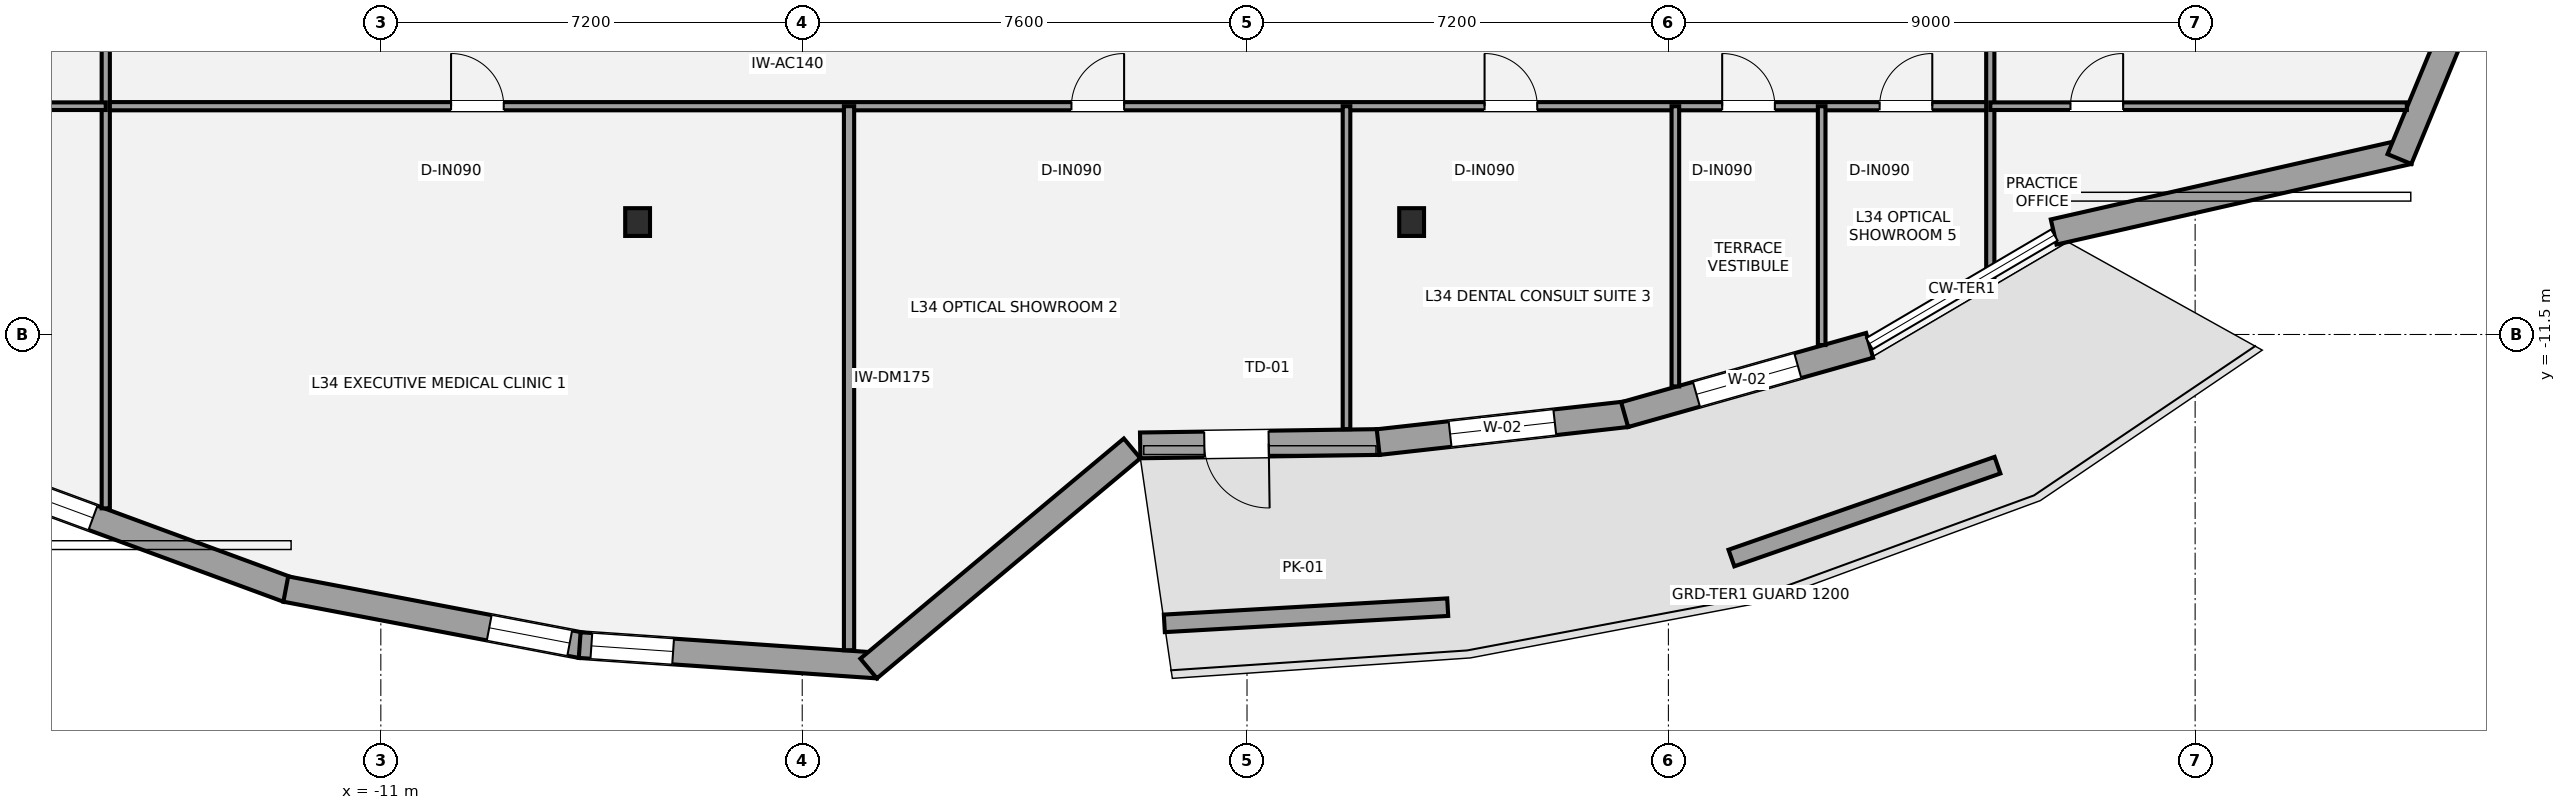
"""IFC4 building model, lengths in metres.
Left out: names, types, materials, properties, quantities, classifications, styles, units other than length and angle.
Written with IfcOpenShell. Run it as: python <this file> out.ifc"""

import sys

from ifc_helpers import new_model, si_unit, direction, frame, frame_2d, origin, origin_2d, place, context, subcontext, project, spatial, rectangle, i_section, extrude, element, fill, save


model = new_model("IFC4")
c1 = context("Model", 3, precision=1e-05, world=origin(), true_north=direction((0.0, 1.0)))
c2 = subcontext(c1, "Body", "Model", "MODEL_VIEW")
j1 = project(units=[si_unit("LENGTHUNIT", "METRE"), si_unit("PLANEANGLEUNIT", "RADIAN")], contexts=[c1])
p1 = place(None, origin())
s1 = spatial("IfcSite", under=j1, at=p1, CompositionType="ELEMENT")
p2 = place(p1, origin())
s2 = spatial("IfcBuilding", under=s1, at=p2, CompositionType="ELEMENT")
p3 = place(p2, frame((0.0, 0.0, 128.1)))
s3 = spatial("IfcBuildingStorey", under=s2, at=p3, CompositionType="ELEMENT", Elevation=128.1)
for number, where, z_axis, x_axis in (
    (1, (-6.613, -9.579, 0.0), (0.0, 0.0, 1.0), (1.0, 0.0, 0.0)),
    (2, (6.613, -9.579, 0.0), (0.0, 0.0, 1.0), (1.0, 0.0, 0.0)),
):
    element("IfcColumn", number, at=place(p3, frame(where, z_axis=z_axis, x_axis=x_axis)), inside=s3, PredefinedType="COLUMN", context=c2, shape_type="SweptSolid", body=[
        extrude(i_section(OverallWidth=0.424, OverallDepth=0.474, WebThickness=0.048, FlangeThickness=0.077, at=origin_2d()), origin(), (0.0, 0.0, 1.0), 3.5),
    ])
p4 = place(p3, frame((-12.589, -15.859, 0.0), z_axis=(0.0, 0.0, 1.0), x_axis=(-0.938408147313, 0.345528796278, 0.0)))
e3 = element("IfcWall", 3, at=p4, inside=s3, PredefinedType="STANDARD", context=c2, shape_type="SweptSolid", body=[
    extrude(rectangle(XDim=4.998, YDim=0.44, at=frame_2d((2.499, 0.0))), origin(), (0.0, 0.0, 1.0), 2.528),
])
p5 = place(p4, frame((3.548, 0.0, 0.58)))
e4 = element("IfcOpeningElement", 4, at=p5, cuts=e3, PredefinedType="OPENING", context=c2, shape_type="SweptSolid", body=[
    extrude(rectangle(XDim=0.9, YDim=1.35, at=frame_2d((0.45, 0.675))), frame((0.0, 0.23, 0.0), z_axis=(0.0, -1.0, 0.0), x_axis=(1.0, 0.0, 0.0)), (0.0, 0.0, 1.0), 0.46),
])
p6 = place(p3, frame((-7.576, -16.809, 0.0), z_axis=(0.0, 0.0, 1.0), x_axis=(-0.982383038938, 0.186878476041, 0.0)))
e5 = element("IfcWall", 5, at=p6, inside=s3, PredefinedType="STANDARD", context=c2, shape_type="SweptSolid", body=[
    extrude(rectangle(XDim=5.138, YDim=0.44, at=frame_2d((2.569, 0.0))), origin(), (0.0, 0.0, 1.0), 2.528),
])
p7 = place(p6, frame((0.2, 0.0, 0.45)))
e6 = element("IfcOpeningElement", 6, at=p7, cuts=e5, PredefinedType="OPENING", context=c2, shape_type="SweptSolid", body=[
    extrude(rectangle(XDim=1.4, YDim=1.55, at=frame_2d((0.7, 0.775))), frame((0.0, 0.23, 0.0), z_axis=(0.0, -1.0, 0.0), x_axis=(1.0, 0.0, 0.0)), (0.0, 0.0, 1.0), 0.46),
])
p8 = place(p3, frame((-2.509, -17.156, 0.0), z_axis=(0.0, 0.0, 1.0), x_axis=(-0.997652685464, 0.068477143536, 0.0)))
e7 = element("IfcWall", 7, at=p8, inside=s3, PredefinedType="STANDARD", context=c2, shape_type="SweptSolid", body=[
    extrude(rectangle(XDim=5.105, YDim=0.44, at=frame_2d((2.553, 0.0))), origin(), (0.0, 0.0, 1.0), 2.528),
])
p9 = place(p8, frame((3.505, 0.0, 0.58)))
e8 = element("IfcOpeningElement", 8, at=p9, cuts=e7, PredefinedType="OPENING", context=c2, shape_type="SweptSolid", body=[
    extrude(rectangle(XDim=1.4, YDim=1.55, at=frame_2d((0.7, 0.775))), frame((0.0, 0.23, 0.0), z_axis=(0.0, -1.0, 0.0), x_axis=(1.0, 0.0, 0.0)), (0.0, 0.0, 1.0), 0.46),
])
p10 = place(p3, frame((1.837, -13.446, 0.0), z_axis=(0.0, 0.0, 1.0), x_axis=(-0.767459949595, -0.641096892652, 0.0)))
e9 = element("IfcWall", 9, at=p10, inside=s3, PredefinedType="STANDARD", context=c2, shape_type="SweptSolid", body=[
    extrude(rectangle(XDim=5.866, YDim=0.44, at=frame_2d((2.933, 0.0))), origin(), (0.0, 0.0, 1.0), 2.528),
])
p11 = place(p3, frame((6.062, -13.337, 0.0), z_axis=(0.0, 0.0, 1.0), x_axis=(-0.999900674046, -0.014094042828, 0.0)))
e10 = element("IfcWall", 10, at=p11, inside=s3, PredefinedType="STANDARD", context=c2, shape_type="SweptSolid", body=[
    extrude(rectangle(XDim=4.088, YDim=0.44, at=frame_2d((2.044, 0.0))), origin(), (0.0, 0.0, 1.0), 2.532),
])
p12 = place(p11, frame((1.892, 0.0, 0.0)))
e11 = element("IfcOpeningElement", 11, at=p12, cuts=e10, PredefinedType="OPENING", context=c2, shape_type="SweptSolid", body=[
    extrude(rectangle(XDim=1.1, YDim=2.15, at=frame_2d((0.55, 1.075))), frame((0.0, 0.23, 0.0), z_axis=(0.0, -1.0, 0.0), x_axis=(1.0, 0.0, 0.0)), (0.0, 0.0, 1.0), 0.46),
])
p13 = place(p3, frame((10.288, -12.862, 0.0), z_axis=(0.0, 0.0, 1.0), x_axis=(-0.99378159324, -0.111346957472, 0.0)))
e12 = element("IfcWall", 12, at=p13, inside=s3, PredefinedType="STANDARD", context=c2, shape_type="SweptSolid", body=[
    extrude(rectangle(XDim=4.273, YDim=0.44, at=frame_2d((2.137, 0.0))), origin(), (0.0, 0.0, 1.0), 2.532),
])
p14 = place(p13, frame((1.237, 0.0, 0.65)))
e13 = element("IfcOpeningElement", 13, at=p14, cuts=e12, PredefinedType="OPENING", context=c2, shape_type="SweptSolid", body=[
    extrude(rectangle(XDim=1.8, YDim=1.7, at=frame_2d((0.9, 0.85))), frame((0.0, 0.23, 0.0), z_axis=(0.0, -1.0, 0.0), x_axis=(1.0, 0.0, 0.0)), (0.0, 0.0, 1.0), 0.46),
])
p15 = place(p3, frame((14.438, -11.686, 0.0), z_axis=(0.0, 0.0, 1.0), x_axis=(-0.962280657569, -0.272058699675, 0.0)))
e14 = element("IfcWall", 14, at=p15, inside=s3, PredefinedType="STANDARD", context=c2, shape_type="SweptSolid", body=[
    extrude(rectangle(XDim=4.35, YDim=0.44, at=frame_2d((2.175, 0.0))), origin(), (0.0, 0.0, 1.0), 2.532),
])
p16 = place(p15, frame((1.275, 0.0, 0.65)))
e15 = element("IfcOpeningElement", 15, at=p16, cuts=e14, PredefinedType="OPENING", context=c2, shape_type="SweptSolid", body=[
    extrude(rectangle(XDim=1.8, YDim=1.7, at=frame_2d((0.9, 0.85))), frame((0.0, 0.23, 0.0), z_axis=(0.0, -1.0, 0.0), x_axis=(1.0, 0.0, 0.0)), (0.0, 0.0, 1.0), 0.46),
])
p17 = place(p3, frame((23.646, -8.373, 0.0), z_axis=(0.0, 0.0, 1.0), x_axis=(-0.975182593308, -0.22140214477, 0.0)))
e16 = element("IfcWall", 16, at=p17, inside=s3, PredefinedType="STANDARD", context=c2, shape_type="SweptSolid", body=[
    extrude(rectangle(XDim=6.217, YDim=0.44, at=frame_2d((3.108, 0.0))), origin(), (0.0, 0.0, 1.0), 2.532),
])
p18 = place(p3, frame((24.908, -5.081, 0.0), z_axis=(0.0, 0.0, 1.0), x_axis=(-0.382433297136, -0.923983102249, 0.0)))
e17 = element("IfcWall", 17, at=p18, inside=s3, PredefinedType="STANDARD", context=c2, shape_type="SweptSolid", body=[
    extrude(rectangle(XDim=3.704, YDim=0.44, at=frame_2d((1.852, 0.0))), origin(), (0.0, 0.0, 1.0), 2.528),
])
p19 = place(p18, frame((0.249, 0.0, 0.42)))
e18 = element("IfcOpeningElement", 18, at=p19, cuts=e17, PredefinedType="OPENING", context=c2, shape_type="SweptSolid", body=[
    extrude(rectangle(XDim=0.9, YDim=1.35, at=frame_2d((0.45, 0.675))), frame((0.0, 0.23, 0.0), z_axis=(0.0, -1.0, 0.0), x_axis=(1.0, 0.0, 0.0)), (0.0, 0.0, 1.0), 0.46),
])
p20 = place(p3, frame((2.387, -16.435, 0.0), z_axis=(0.0, 0.0, 1.0), x_axis=(0.998369203745, 0.0570870652, 0.0)))
e19 = element("IfcWall", 19, at=p20, inside=s3, PredefinedType="PARAPET", context=c2, shape_type="SweptSolid", body=[
    extrude(rectangle(XDim=4.85, YDim=0.3, at=frame_2d((2.425, 0.0))), origin(), (0.0, 0.0, 1.0), 0.45),
])
p21 = place(p3, frame((12.077, -15.319, 0.0), z_axis=(0.0, 0.0, 1.0), x_axis=(0.944174140156, 0.329446798528, 0.0)))
e20 = element("IfcWall", 20, at=p21, inside=s3, PredefinedType="PARAPET", context=c2, shape_type="SweptSolid", body=[
    extrude(rectangle(XDim=4.815, YDim=0.3, at=frame_2d((2.407, 0.0))), origin(), (0.0, 0.0, 1.0), 0.45),
])
p22 = place(p3, frame((-15.7, -7.6, 0.0), z_axis=(0.0, 0.0, 1.0), x_axis=(1.0, 0.0, 0.0)))
e21 = element("IfcWall", 21, at=p22, inside=s3, PredefinedType="PARTITIONING", context=c2, shape_type="SweptSolid", body=[
    extrude(rectangle(XDim=32.2, YDim=0.14, at=frame_2d((16.1, 0.0))), origin(), (0.0, 0.0, 1.0), 2.688),
])
p23 = place(p22, frame((5.9, 0.0, 0.0)))
e22 = element("IfcOpeningElement", 22, at=p23, cuts=e21, PredefinedType="OPENING", context=c2, shape_type="SweptSolid", body=[
    extrude(rectangle(XDim=0.9, YDim=2.1, at=frame_2d((0.45, 1.05))), frame((0.0, 0.08, 0.0), z_axis=(0.0, -1.0, 0.0), x_axis=(1.0, 0.0, 0.0)), (0.0, 0.0, 1.0), 0.16),
])
p24 = place(p22, frame((16.5, 0.0, 0.0)))
e23 = element("IfcOpeningElement", 23, at=p24, cuts=e21, PredefinedType="OPENING", context=c2, shape_type="SweptSolid", body=[
    extrude(rectangle(XDim=0.9, YDim=2.1, at=frame_2d((0.45, 1.05))), frame((0.0, 0.08, 0.0), z_axis=(0.0, -1.0, 0.0), x_axis=(1.0, 0.0, 0.0)), (0.0, 0.0, 1.0), 0.16),
])
p25 = place(p22, frame((23.559, 0.0, 0.0)))
e24 = element("IfcOpeningElement", 24, at=p25, cuts=e21, PredefinedType="OPENING", context=c2, shape_type="SweptSolid", body=[
    extrude(rectangle(XDim=0.9, YDim=2.1, at=frame_2d((0.45, 1.05))), frame((0.0, 0.08, 0.0), z_axis=(0.0, -1.0, 0.0), x_axis=(1.0, 0.0, 0.0)), (0.0, 0.0, 1.0), 0.16),
])
p26 = place(p22, frame((27.619, 0.0, 0.0)))
e25 = element("IfcOpeningElement", 25, at=p26, cuts=e21, PredefinedType="OPENING", context=c2, shape_type="SweptSolid", body=[
    extrude(rectangle(XDim=0.9, YDim=2.1, at=frame_2d((0.45, 1.05))), frame((0.0, 0.08, 0.0), z_axis=(0.0, -1.0, 0.0), x_axis=(1.0, 0.0, 0.0)), (0.0, 0.0, 1.0), 0.16),
])
p27 = place(p22, frame((30.309, 0.0, 0.0)))
e26 = element("IfcOpeningElement", 26, at=p27, cuts=e21, PredefinedType="OPENING", context=c2, shape_type="SweptSolid", body=[
    extrude(rectangle(XDim=0.9, YDim=2.1, at=frame_2d((0.45, 1.05))), frame((0.0, 0.08, 0.0), z_axis=(0.0, -1.0, 0.0), x_axis=(1.0, 0.0, 0.0)), (0.0, 0.0, 1.0), 0.16),
])
p28 = place(p3, frame((-15.7, -14.47, 0.0), z_axis=(0.0, 0.0, 1.0), x_axis=(0.0, 1.0, 0.0)))
e27 = element("IfcWall", 27, at=p28, inside=s3, PredefinedType="PARTITIONING", context=c2, shape_type="SweptSolid", body=[
    extrude(rectangle(XDim=22.02, YDim=0.14, at=frame_2d((11.01, 0.0))), origin(), (0.0, 0.0, 1.0), 2.763),
])
p29 = place(p28, frame((9.32, 0.0, 0.0)))
e28 = element("IfcOpeningElement", 28, at=p29, cuts=e27, PredefinedType="OPENING", context=c2, shape_type="SweptSolid", body=[
    extrude(rectangle(XDim=0.9, YDim=2.1, at=frame_2d((0.45, 1.05))), frame((0.0, 0.08, 0.0), z_axis=(0.0, -1.0, 0.0), x_axis=(1.0, 0.0, 0.0)), (0.0, 0.0, 1.0), 0.16),
])
p30 = place(p28, frame((14.42, 0.0, 0.0)))
e29 = element("IfcOpeningElement", 29, at=p30, cuts=e27, PredefinedType="OPENING", context=c2, shape_type="SweptSolid", body=[
    extrude(rectangle(XDim=0.9, YDim=2.1, at=frame_2d((0.45, 1.05))), frame((0.0, 0.08, 0.0), z_axis=(0.0, -1.0, 0.0), x_axis=(1.0, 0.0, 0.0)), (0.0, 0.0, 1.0), 0.16),
])
p31 = place(p28, frame((19.095, 0.0, 0.0)))
e30 = element("IfcOpeningElement", 30, at=p31, cuts=e27, PredefinedType="OPENING", context=c2, shape_type="SweptSolid", body=[
    extrude(rectangle(XDim=0.9, YDim=2.1, at=frame_2d((0.45, 1.05))), frame((0.0, 0.08, 0.0), z_axis=(0.0, -1.0, 0.0), x_axis=(1.0, 0.0, 0.0)), (0.0, 0.0, 1.0), 0.16),
])
p32 = place(p3, frame((16.5, -10.633, 0.0), z_axis=(0.0, 0.0, 1.0), x_axis=(0.0, 1.0, 0.0)))
e31 = element("IfcWall", 31, at=p32, inside=s3, PredefinedType="PARTITIONING", context=c2, shape_type="SweptSolid", body=[
    extrude(rectangle(XDim=18.183, YDim=0.14, at=frame_2d((9.091, 0.0))), origin(), (0.0, 0.0, 1.0), 2.763),
])
p33 = place(p32, frame((5.883, 0.0, 0.0)))
e32 = element("IfcOpeningElement", 32, at=p33, cuts=e31, PredefinedType="OPENING", context=c2, shape_type="SweptSolid", body=[
    extrude(rectangle(XDim=0.9, YDim=2.1, at=frame_2d((0.45, 1.05))), frame((0.0, 0.08, 0.0), z_axis=(0.0, -1.0, 0.0), x_axis=(1.0, 0.0, 0.0)), (0.0, 0.0, 1.0), 0.16),
])
p34 = place(p32, frame((11.483, 0.0, 0.0)))
e33 = element("IfcOpeningElement", 33, at=p34, cuts=e31, PredefinedType="OPENING", context=c2, shape_type="SweptSolid", body=[
    extrude(rectangle(XDim=0.9, YDim=2.1, at=frame_2d((0.45, 1.05))), frame((0.0, 0.08, 0.0), z_axis=(0.0, -1.0, 0.0), x_axis=(1.0, 0.0, 0.0)), (0.0, 0.0, 1.0), 0.16),
])
p35 = place(p32, frame((15.758, 0.0, 0.0)))
e34 = element("IfcOpeningElement", 34, at=p35, cuts=e31, PredefinedType="OPENING", context=c2, shape_type="SweptSolid", body=[
    extrude(rectangle(XDim=0.9, YDim=2.1, at=frame_2d((0.45, 1.05))), frame((0.0, 0.08, 0.0), z_axis=(0.0, -1.0, 0.0), x_axis=(1.0, 0.0, 0.0)), (0.0, 0.0, 1.0), 0.16),
])
p36 = place(p3, frame((-3.0, -16.893, 0.0), z_axis=(0.0, 0.0, 1.0), x_axis=(0.0, 1.0, 0.0)))
e35 = element("IfcWall", 35, at=p36, inside=s3, PredefinedType="PARTITIONING", context=c2, shape_type="SweptSolid", body=[
    extrude(rectangle(XDim=9.293, YDim=0.175, at=frame_2d((4.646, 0.0))), origin(), (0.0, 0.0, 1.0), 2.763),
])
p37 = place(p3, frame((5.5, -13.117, 0.0), z_axis=(0.0, 0.0, 1.0), x_axis=(0.0, 1.0, 0.0)))
e36 = element("IfcWall", 36, at=p37, inside=s3, PredefinedType="PARTITIONING", context=c2, shape_type="SweptSolid", body=[
    extrude(rectangle(XDim=5.517, YDim=0.13, at=frame_2d((2.758, 0.0))), origin(), (0.0, 0.0, 1.0), 2.763),
])
p38 = place(p3, frame((11.119, -12.387, 0.0), z_axis=(0.0, 0.0, 1.0), x_axis=(0.0, 1.0, 0.0)))
e37 = element("IfcWall", 37, at=p38, inside=s3, PredefinedType="PARTITIONING", context=c2, shape_type="SweptSolid", body=[
    extrude(rectangle(XDim=4.787, YDim=0.13, at=frame_2d((2.394, 0.0))), origin(), (0.0, 0.0, 1.0), 3.31),
])
p39 = place(p3, frame((13.619, -11.68, 0.0), z_axis=(0.0, 0.0, 1.0), x_axis=(0.0, 1.0, 0.0)))
e38 = element("IfcWall", 38, at=p39, inside=s3, PredefinedType="PARTITIONING", context=c2, shape_type="SweptSolid", body=[
    extrude(rectangle(XDim=4.08, YDim=0.13, at=frame_2d((2.04, 0.0))), origin(), (0.0, 0.0, 1.0), 2.763),
])
p40 = place(p3, frame((-23.618, -7.6, 0.0), z_axis=(0.0, 0.0, 1.0), x_axis=(1.0, 0.0, 0.0)))
e39 = element("IfcWall", 39, at=p40, inside=s3, PredefinedType="PARTITIONING", context=c2, shape_type="SweptSolid", body=[
    extrude(rectangle(XDim=7.918, YDim=0.13, at=frame_2d((3.959, 0.0))), origin(), (0.0, 0.0, 1.0), 3.31),
])
p41 = place(p40, frame((0.99, 0.0, 0.0)))
e40 = element("IfcOpeningElement", 40, at=p41, cuts=e39, PredefinedType="OPENING", context=c2, shape_type="SweptSolid", body=[
    extrude(rectangle(XDim=0.9, YDim=2.1, at=frame_2d((0.45, 1.05))), frame((0.0, 0.075, 0.0), z_axis=(0.0, -1.0, 0.0), x_axis=(1.0, 0.0, 0.0)), (0.0, 0.0, 1.0), 0.15),
])
p42 = place(p3, frame((16.5, -7.6, 0.0), z_axis=(0.0, 0.0, 1.0), x_axis=(1.0, 0.0, 0.0)))
e41 = element("IfcWall", 41, at=p42, inside=s3, PredefinedType="PARTITIONING", context=c2, shape_type="SweptSolid", body=[
    extrude(rectangle(XDim=7.118, YDim=0.13, at=frame_2d((3.559, 0.0))), origin(), (0.0, 0.0, 1.0), 2.763),
])
p43 = place(p42, frame((1.37, 0.0, 0.0)))
e42 = element("IfcOpeningElement", 42, at=p43, cuts=e41, PredefinedType="OPENING", context=c2, shape_type="SweptSolid", body=[
    extrude(rectangle(XDim=0.9, YDim=2.1, at=frame_2d((0.45, 1.05))), frame((0.0, 0.075, 0.0), z_axis=(0.0, -1.0, 0.0), x_axis=(1.0, 0.0, 0.0)), (0.0, 0.0, 1.0), 0.15),
])
p44 = place(p5, origin())
e43 = element("IfcWindow", 43, at=p44, inside=s3, PartitioningType="SINGLE_PANEL", PredefinedType="WINDOW", context=c2, shape_type="SweptSolid", body=[
    extrude(rectangle(XDim=0.9, YDim=1.35, at=frame_2d((0.45, 0.675))), frame((0.0, -0.01, 0.0), z_axis=(0.0, -1.0, 0.0), x_axis=(1.0, 0.0, 0.0)), (0.0, 0.0, 1.0), 0.06),
])
fill(e4, e43)
p45 = place(p7, origin())
e44 = element("IfcWindow", 44, at=p45, inside=s3, PartitioningType="SINGLE_PANEL", PredefinedType="WINDOW", context=c2, shape_type="SweptSolid", body=[
    extrude(rectangle(XDim=1.4, YDim=1.55, at=frame_2d((0.7, 0.775))), frame((0.0, -0.01, 0.0), z_axis=(0.0, -1.0, 0.0), x_axis=(1.0, 0.0, 0.0)), (0.0, 0.0, 1.0), 0.06),
])
fill(e6, e44)
p46 = place(p9, origin())
e45 = element("IfcWindow", 45, at=p46, inside=s3, PartitioningType="SINGLE_PANEL", PredefinedType="WINDOW", context=c2, shape_type="SweptSolid", body=[
    extrude(rectangle(XDim=1.4, YDim=1.55, at=frame_2d((0.7, 0.775))), frame((0.0, -0.01, 0.0), z_axis=(0.0, -1.0, 0.0), x_axis=(1.0, 0.0, 0.0)), (0.0, 0.0, 1.0), 0.06),
])
fill(e8, e45)
p47 = place(p12, origin())
e46 = element("IfcDoor", 46, at=p47, inside=s3, OperationType="SINGLE_SWING_LEFT", PredefinedType="DOOR", context=c2, shape_type="SweptSolid", body=[
    extrude(rectangle(XDim=1.1, YDim=2.15, at=frame_2d((0.55, 1.075))), frame((0.0, 0.025, 0.0), z_axis=(0.0, -1.0, 0.0), x_axis=(1.0, 0.0, 0.0)), (0.0, 0.0, 1.0), 0.05),
])
fill(e11, e46)
p48 = place(p14, origin())
e47 = element("IfcWindow", 47, at=p48, inside=s3, PartitioningType="SINGLE_PANEL", PredefinedType="WINDOW", context=c2, shape_type="SweptSolid", body=[
    extrude(rectangle(XDim=1.8, YDim=1.7, at=frame_2d((0.9, 0.85))), frame((0.0, -0.01, 0.0), z_axis=(0.0, -1.0, 0.0), x_axis=(1.0, 0.0, 0.0)), (0.0, 0.0, 1.0), 0.06),
])
fill(e13, e47)
p49 = place(p16, origin())
e48 = element("IfcWindow", 48, at=p49, inside=s3, PartitioningType="SINGLE_PANEL", PredefinedType="WINDOW", context=c2, shape_type="SweptSolid", body=[
    extrude(rectangle(XDim=1.8, YDim=1.7, at=frame_2d((0.9, 0.85))), frame((0.0, -0.01, 0.0), z_axis=(0.0, -1.0, 0.0), x_axis=(1.0, 0.0, 0.0)), (0.0, 0.0, 1.0), 0.06),
])
fill(e15, e48)
p50 = place(p23, origin())
e49 = element("IfcDoor", 49, at=p50, inside=s3, OperationType="SINGLE_SWING_LEFT", PredefinedType="DOOR", context=c2, shape_type="SweptSolid", body=[
    extrude(rectangle(XDim=0.9, YDim=2.1, at=frame_2d((0.45, 1.05))), frame((0.0, 0.025, 0.0), z_axis=(0.0, -1.0, 0.0), x_axis=(1.0, 0.0, 0.0)), (0.0, 0.0, 1.0), 0.05),
])
fill(e22, e49)
p51 = place(p24, origin())
e50 = element("IfcDoor", 50, at=p51, inside=s3, OperationType="SINGLE_SWING_RIGHT", PredefinedType="DOOR", context=c2, shape_type="SweptSolid", body=[
    extrude(rectangle(XDim=0.9, YDim=2.1, at=frame_2d((0.45, 1.05))), frame((0.0, 0.025, 0.0), z_axis=(0.0, -1.0, 0.0), x_axis=(1.0, 0.0, 0.0)), (0.0, 0.0, 1.0), 0.05),
])
fill(e23, e50)
p52 = place(p25, origin())
e51 = element("IfcDoor", 51, at=p52, inside=s3, OperationType="SINGLE_SWING_LEFT", PredefinedType="DOOR", context=c2, shape_type="SweptSolid", body=[
    extrude(rectangle(XDim=0.9, YDim=2.1, at=frame_2d((0.45, 1.05))), frame((0.0, 0.025, 0.0), z_axis=(0.0, -1.0, 0.0), x_axis=(1.0, 0.0, 0.0)), (0.0, 0.0, 1.0), 0.05),
])
fill(e24, e51)
p53 = place(p26, origin())
e52 = element("IfcDoor", 52, at=p53, inside=s3, OperationType="SINGLE_SWING_LEFT", PredefinedType="DOOR", context=c2, shape_type="SweptSolid", body=[
    extrude(rectangle(XDim=0.9, YDim=2.1, at=frame_2d((0.45, 1.05))), frame((0.0, 0.025, 0.0), z_axis=(0.0, -1.0, 0.0), x_axis=(1.0, 0.0, 0.0)), (0.0, 0.0, 1.0), 0.05),
])
fill(e25, e52)
p54 = place(p27, origin())
e53 = element("IfcDoor", 53, at=p54, inside=s3, OperationType="SINGLE_SWING_RIGHT", PredefinedType="DOOR", context=c2, shape_type="SweptSolid", body=[
    extrude(rectangle(XDim=0.9, YDim=2.1, at=frame_2d((0.45, 1.05))), frame((0.0, 0.025, 0.0), z_axis=(0.0, -1.0, 0.0), x_axis=(1.0, 0.0, 0.0)), (0.0, 0.0, 1.0), 0.05),
])
fill(e26, e53)
p55 = place(p43, origin())
e54 = element("IfcDoor", 54, at=p55, inside=s3, OperationType="SINGLE_SWING_RIGHT", PredefinedType="DOOR", context=c2, shape_type="SweptSolid", body=[
    extrude(rectangle(XDim=0.9, YDim=2.1, at=frame_2d((0.45, 1.05))), frame((0.0, 0.025, 0.0), z_axis=(0.0, -1.0, 0.0), x_axis=(1.0, 0.0, 0.0)), (0.0, 0.0, 1.0), 0.05),
])
fill(e42, e54)
save(model, sys.argv[1])
